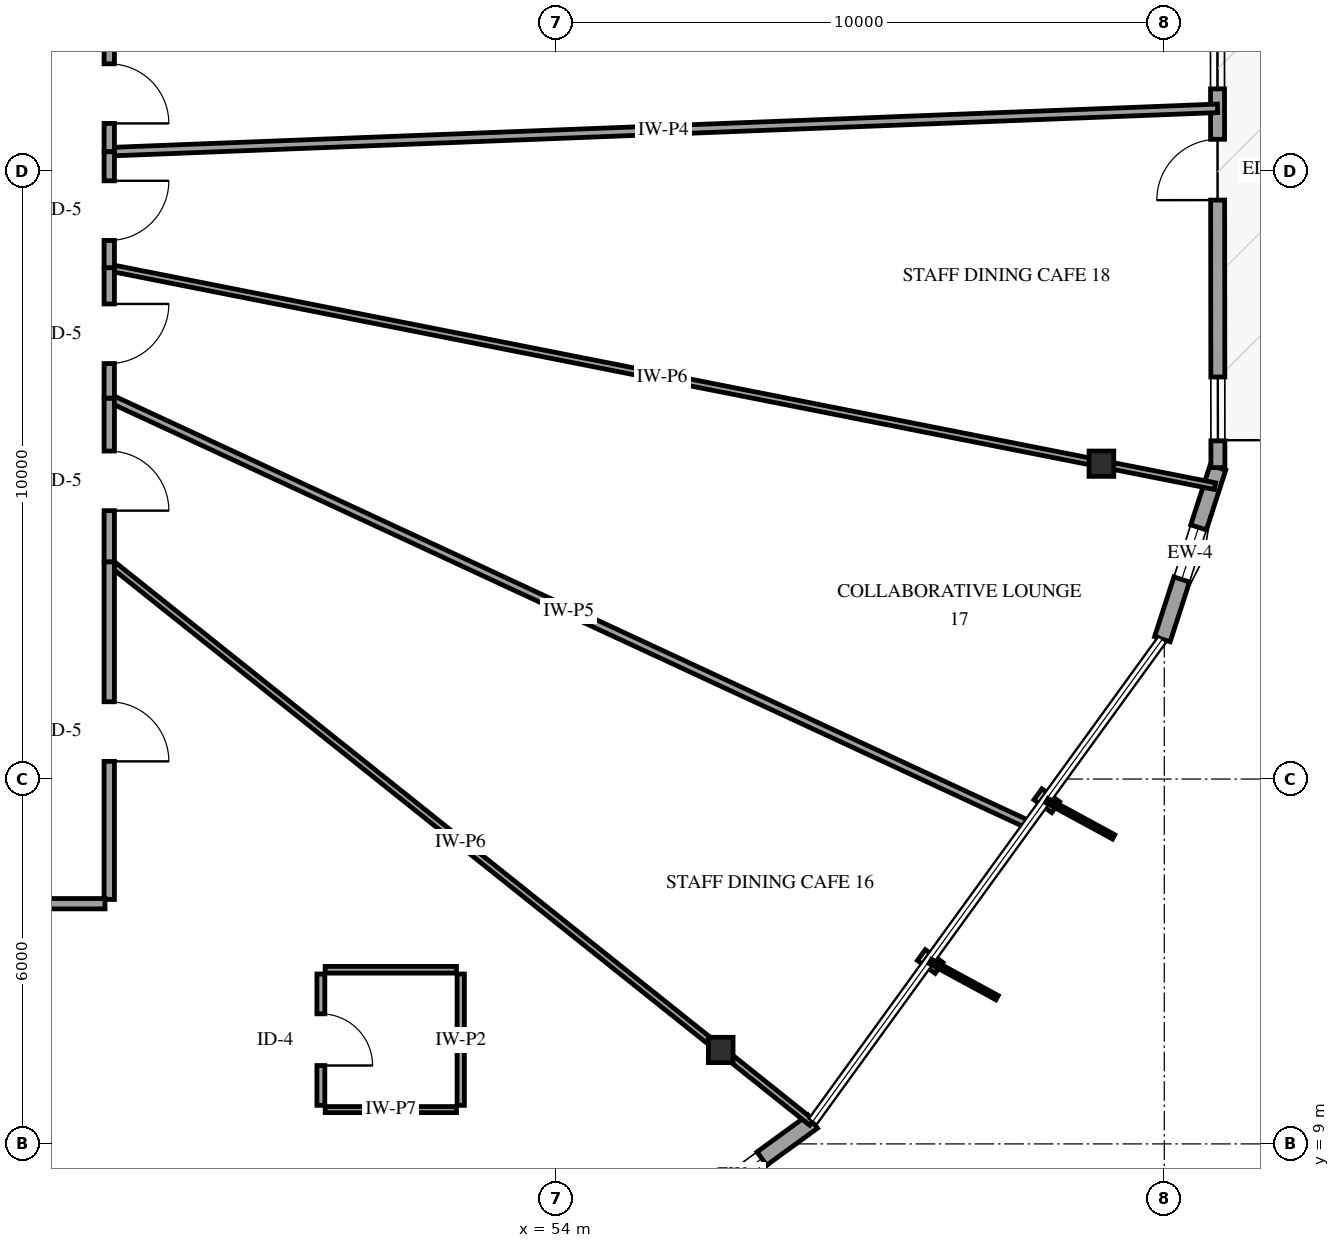
"""IFC4 building model, lengths in metres.
Left out: names, types, materials, properties, quantities, classifications, styles, units other than length and angle.
Written with IfcOpenShell. Run it as: python <this file> out.ifc"""

import sys

from ifc_helpers import new_model, si_unit, direction, frame, frame_2d, origin, origin_2d, place, context, subcontext, project, spatial, rectangle, i_section, extrude, element, fill, save


model = new_model("IFC4")
c1 = context("Model", 3, precision=1e-05, world=origin(), true_north=direction((0.0, 1.0)))
c2 = subcontext(c1, "Body", "Model", "MODEL_VIEW")
j1 = project(units=[si_unit("LENGTHUNIT", "METRE"), si_unit("PLANEANGLEUNIT", "RADIAN")], contexts=[c1])
p1 = place(None, origin())
s1 = spatial("IfcSite", under=j1, at=p1, CompositionType="ELEMENT")
p2 = place(p1, origin())
s2 = spatial("IfcBuilding", under=s1, at=p2, CompositionType="ELEMENT")
p3 = place(p2, frame((0.0, 0.0, 230.2)))
s3 = spatial("IfcBuildingStorey", under=s2, at=p3, CompositionType="ELEMENT", Elevation=230.2)
for number, where, z_axis, x_axis in (
    (1, (56.705, 10.545, 0.0), (0.0, 0.0, 1.0), (1.0, 0.0, 0.0)),
    (2, (62.966, 20.186, 0.0), (0.0, 0.0, 1.0), (1.0, 0.0, 0.0)),
):
    element("IfcColumn", number, at=place(p3, frame(where, z_axis=z_axis, x_axis=x_axis)), inside=s3, PredefinedType="COLUMN", context=c2, shape_type="SweptSolid", body=[
        extrude(i_section(OverallWidth=0.406, OverallDepth=0.416, WebThickness=0.03, FlangeThickness=0.048, FilletRadius=0.038, at=origin_2d()), origin(), (0.0, 0.0, 1.0), 3.6),
    ])
p4 = place(p3, frame((55.82, 7.621, 0.0), z_axis=(0.0, 0.0, 1.0), x_axis=(0.808383627719, 0.58865602047, 0.0)))
e3 = element("IfcWall", 3, at=p4, inside=s3, PredefinedType="SOLIDWALL", context=c2, shape_type="SweptSolid", body=[
    extrude(rectangle(XDim=2.967, YDim=0.27, at=frame_2d((1.483, 0.0))), origin(), (0.0, 0.0, 1.0), 2.679),
])
p5 = place(p4, frame((1.033, 0.0, 0.75)))
e4 = element("IfcOpeningElement", 4, at=p5, cuts=e3, PredefinedType="OPENING", context=c2, shape_type="SweptSolid", body=[
    extrude(rectangle(XDim=0.9, YDim=1.5, at=frame_2d((0.45, 0.75))), frame((0.0, 0.145, 0.0), z_axis=(0.0, -1.0, 0.0), x_axis=(1.0, 0.0, 0.0)), (0.0, 0.0, 1.0), 0.29),
])
p6 = place(p3, frame((63.969, 17.3, 0.0), z_axis=(0.0, 0.0, 1.0), x_axis=(0.307945174151, 0.95140410432, 0.0)))
e5 = element("IfcWall", 5, at=p6, inside=s3, PredefinedType="SOLIDWALL", context=c2, shape_type="SweptSolid", body=[
    extrude(rectangle(XDim=2.967, YDim=0.27, at=frame_2d((1.483, 0.0))), origin(), (0.0, 0.0, 1.0), 2.679),
])
p7 = place(p6, frame((1.033, 0.0, 0.75)))
e6 = element("IfcOpeningElement", 6, at=p7, cuts=e5, PredefinedType="OPENING", context=c2, shape_type="SweptSolid", body=[
    extrude(rectangle(XDim=0.9, YDim=1.5, at=frame_2d((0.45, 0.75))), frame((0.0, 0.145, 0.0), z_axis=(0.0, -1.0, 0.0), x_axis=(1.0, 0.0, 0.0)), (0.0, 0.0, 1.0), 0.29),
])
p8 = place(p3, frame((64.882, 20.122, 0.0), z_axis=(0.0, 0.0, 1.0), x_axis=(-0.001046571902, 0.999999452343, 0.0)))
e7 = element("IfcWall", 7, at=p8, inside=s3, PredefinedType="SOLIDWALL", context=c2, shape_type="SweptSolid", body=[
    extrude(rectangle(XDim=9.798, YDim=0.23, at=frame_2d((4.899, 0.0))), origin(), (0.0, 0.0, 1.0), 2.679),
])
p9 = place(p8, frame((4.399, 0.0, 0.0)))
e8 = element("IfcOpeningElement", 8, at=p9, cuts=e7, PredefinedType="OPENING", context=c2, shape_type="SweptSolid", body=[
    extrude(rectangle(XDim=1.0, YDim=2.15, at=frame_2d((0.5, 1.075))), frame((0.0, 0.125, 0.0), z_axis=(0.0, -1.0, 0.0), x_axis=(1.0, 0.0, 0.0)), (0.0, 0.0, 1.0), 0.25),
])
p10 = place(p8, frame((0.44, 0.0, 0.72)))
e9 = element("IfcOpeningElement", 9, at=p10, cuts=e7, PredefinedType="OPENING", context=c2, shape_type="SweptSolid", body=[
    extrude(rectangle(XDim=1.05, YDim=1.55, at=frame_2d((0.525, 0.775))), frame((0.0, 0.125, 0.0), z_axis=(0.0, -1.0, 0.0), x_axis=(1.0, 0.0, 0.0)), (0.0, 0.0, 1.0), 0.25),
])
p11 = place(p8, frame((6.228, 0.0, 0.72)))
e10 = element("IfcOpeningElement", 10, at=p11, cuts=e7, PredefinedType="OPENING", context=c2, shape_type="SweptSolid", body=[
    extrude(rectangle(XDim=1.05, YDim=1.55, at=frame_2d((0.525, 0.775))), frame((0.0, 0.125, 0.0), z_axis=(0.0, -1.0, 0.0), x_axis=(1.0, 0.0, 0.0)), (0.0, 0.0, 1.0), 0.25),
])
p12 = place(p3, frame((46.65, 23.41, 0.0), z_axis=(0.0, 0.0, 1.0), x_axis=(0.981032456838, -0.193843541625, 0.0)))
e11 = element("IfcWall", 11, at=p12, inside=s3, PredefinedType="PARTITIONING", context=c2, shape_type="SweptSolid", body=[
    extrude(rectangle(XDim=18.536, YDim=0.11, at=frame_2d((9.268, 0.0))), origin(), (0.0, 0.0, 1.0), 2.595),
])
p13 = place(p3, frame((64.876, 26.03, 0.0), z_axis=(0.0, 0.0, 1.0), x_axis=(-0.999233316869, -0.039150714655, 0.0)))
e12 = element("IfcWall", 12, at=p13, inside=s3, PredefinedType="PARTITIONING", context=c2, shape_type="SweptSolid", body=[
    extrude(rectangle(XDim=18.24, YDim=0.14, at=frame_2d((9.12, 0.0))), origin(), (0.0, 0.0, 1.0), 3.3),
])
p14 = place(p3, frame((46.65, 21.265, 0.0), z_axis=(0.0, 0.0, 1.0), x_axis=(0.907110307169, -0.420892968137, 0.0)))
e13 = element("IfcWall", 13, at=p14, inside=s3, PredefinedType="PARTITIONING", context=c2, shape_type="SweptSolid", body=[
    extrude(rectangle(XDim=16.657, YDim=0.13, at=frame_2d((8.329, 0.0))), origin(), (0.0, 0.0, 1.0), 3.3),
])
p15 = place(p3, frame((46.65, 18.573, 0.0), z_axis=(0.0, 0.0, 1.0), x_axis=(0.781517773411, -0.623882977683, 0.0)))
e14 = element("IfcWall", 14, at=p15, inside=s3, PredefinedType="PARTITIONING", context=c2, shape_type="SweptSolid", body=[
    extrude(rectangle(XDim=14.781, YDim=0.11, at=frame_2d((7.391, 0.0))), origin(), (0.0, 0.0, 1.0), 3.3),
])
p16 = place(p3, frame((46.65, 18.573, 0.0), z_axis=(0.0, 0.0, 1.0), x_axis=(0.0, -1.0, 0.0)))
e15 = element("IfcWall", 15, at=p16, inside=s3, PredefinedType="PARTITIONING", context=c2, shape_type="SweptSolid", body=[
    extrude(rectangle(XDim=5.553, YDim=0.17, at=frame_2d((2.776, 0.0))), origin(), (0.0, 0.0, 1.0), 3.3),
])
p17 = place(p16, frame((2.302, 0.0, 0.0)))
e16 = element("IfcOpeningElement", 16, at=p17, cuts=e15, PredefinedType="OPENING", context=c2, shape_type="SweptSolid", body=[
    extrude(rectangle(XDim=0.98, YDim=2.15, at=frame_2d((0.49, 1.075))), frame((0.0, 0.095, 0.0), z_axis=(0.0, -1.0, 0.0), x_axis=(1.0, 0.0, 0.0)), (0.0, 0.0, 1.0), 0.19),
])
p18 = place(p3, frame((46.58, 12.95, 0.0), z_axis=(0.0, 0.0, 1.0), x_axis=(-1.0, 0.0, 0.0)))
e17 = element("IfcWall", 17, at=p18, inside=s3, PredefinedType="PARTITIONING", context=c2, shape_type="SweptSolid", body=[
    extrude(rectangle(XDim=5.38, YDim=0.17, at=frame_2d((2.69, 0.0))), origin(), (0.0, 0.0, 1.0), 3.3),
])
p19 = place(p3, frame((46.65, 21.265, 0.0), z_axis=(0.0, 0.0, 1.0), x_axis=(0.0, -1.0, 0.0)))
e18 = element("IfcWall", 18, at=p19, inside=s3, PredefinedType="PARTITIONING", context=c2, shape_type="SweptSolid", body=[
    extrude(rectangle(XDim=2.692, YDim=0.17, at=frame_2d((1.346, 0.0))), origin(), (0.0, 0.0, 1.0), 3.3),
])
p20 = place(p19, frame((0.871, 0.0, 0.0)))
e19 = element("IfcOpeningElement", 19, at=p20, cuts=e18, PredefinedType="OPENING", context=c2, shape_type="SweptSolid", body=[
    extrude(rectangle(XDim=0.98, YDim=2.15, at=frame_2d((0.49, 1.075))), frame((0.0, 0.095, 0.0), z_axis=(0.0, -1.0, 0.0), x_axis=(1.0, 0.0, 0.0)), (0.0, 0.0, 1.0), 0.19),
])
p21 = place(p3, frame((50.13, 11.794, 0.0), z_axis=(0.0, 0.0, 1.0), x_axis=(0.0, -1.0, 0.0)))
e20 = element("IfcWall", 20, at=p21, inside=s3, PredefinedType="PARTITIONING", context=c2, shape_type="SweptSolid", body=[
    extrude(rectangle(XDim=2.16, YDim=0.13, at=frame_2d((1.08, 0.0))), origin(), (0.0, 0.0, 1.0), 3.3),
])
p22 = place(p21, frame((0.655, 0.0, 0.0)))
e21 = element("IfcOpeningElement", 21, at=p22, cuts=e20, PredefinedType="OPENING", context=c2, shape_type="SweptSolid", body=[
    extrude(rectangle(XDim=0.85, YDim=2.1, at=frame_2d((0.425, 1.05))), frame((0.0, 0.075, 0.0), z_axis=(0.0, -1.0, 0.0), x_axis=(1.0, 0.0, 0.0)), (0.0, 0.0, 1.0), 0.15),
])
p23 = place(p3, frame((52.43, 9.634, 0.0), z_axis=(0.0, 0.0, 1.0), x_axis=(0.0, 1.0, 0.0)))
e22 = element("IfcWall", 22, at=p23, inside=s3, PredefinedType="PARTITIONING", context=c2, shape_type="SweptSolid", body=[
    extrude(rectangle(XDim=2.16, YDim=0.12, at=frame_2d((1.08, 0.0))), origin(), (0.0, 0.0, 1.0), 3.3),
])
p24 = place(p3, frame((52.36, 11.864, 0.0), z_axis=(0.0, 0.0, 1.0), x_axis=(-1.0, 0.0, 0.0)))
e23 = element("IfcWall", 23, at=p24, inside=s3, PredefinedType="PARTITIONING", context=c2, shape_type="SweptSolid", body=[
    extrude(rectangle(XDim=2.16, YDim=0.11, at=frame_2d((1.08, 0.0))), origin(), (0.0, 0.0, 1.0), 3.3),
])
p25 = place(p3, frame((50.2, 9.564, 0.0), z_axis=(0.0, 0.0, 1.0), x_axis=(1.0, 0.0, 0.0)))
e24 = element("IfcWall", 24, at=p25, inside=s3, PredefinedType="PARTITIONING", context=c2, shape_type="SweptSolid", body=[
    extrude(rectangle(XDim=2.16, YDim=0.1, at=frame_2d((1.08, 0.0))), origin(), (0.0, 0.0, 1.0), 3.3),
])
p26 = place(p3, frame((46.65, 23.41, 0.0), z_axis=(0.0, 0.0, 1.0), x_axis=(0.0, -1.0, 0.0)))
e25 = element("IfcWall", 25, at=p26, inside=s3, PredefinedType="PARTITIONING", context=c2, shape_type="SweptSolid", body=[
    extrude(rectangle(XDim=2.145, YDim=0.17, at=frame_2d((1.073, 0.0))), origin(), (0.0, 0.0, 1.0), 3.3),
])
p27 = place(p26, frame((0.597, 0.0, 0.0)))
e26 = element("IfcOpeningElement", 26, at=p27, cuts=e25, PredefinedType="OPENING", context=c2, shape_type="SweptSolid", body=[
    extrude(rectangle(XDim=0.98, YDim=2.15, at=frame_2d((0.49, 1.075))), frame((0.0, 0.095, 0.0), z_axis=(0.0, -1.0, 0.0), x_axis=(1.0, 0.0, 0.0)), (0.0, 0.0, 1.0), 0.19),
])
p28 = place(p3, frame((46.65, 27.258, 0.0), z_axis=(0.0, 0.0, 1.0), x_axis=(0.0, -1.0, 0.0)))
e27 = element("IfcWall", 27, at=p28, inside=s3, PredefinedType="PARTITIONING", context=c2, shape_type="SweptSolid", body=[
    extrude(rectangle(XDim=1.942, YDim=0.17, at=frame_2d((0.971, 0.0))), origin(), (0.0, 0.0, 1.0), 3.3),
])
p29 = place(p28, frame((0.496, 0.0, 0.0)))
e28 = element("IfcOpeningElement", 28, at=p29, cuts=e27, PredefinedType="OPENING", context=c2, shape_type="SweptSolid", body=[
    extrude(rectangle(XDim=0.98, YDim=2.15, at=frame_2d((0.49, 1.075))), frame((0.0, 0.095, 0.0), z_axis=(0.0, -1.0, 0.0), x_axis=(1.0, 0.0, 0.0)), (0.0, 0.0, 1.0), 0.19),
])
p30 = place(p3, frame((46.65, 25.316, 0.0), z_axis=(0.0, 0.0, 1.0), x_axis=(0.0, -1.0, 0.0)))
e29 = element("IfcWall", 29, at=p30, inside=s3, PredefinedType="PARTITIONING", context=c2, shape_type="SweptSolid", body=[
    extrude(rectangle(XDim=1.906, YDim=0.17, at=frame_2d((0.953, 0.0))), origin(), (0.0, 0.0, 1.0), 3.3),
])
p31 = place(p30, frame((0.478, 0.0, 0.0)))
e30 = element("IfcOpeningElement", 30, at=p31, cuts=e29, PredefinedType="OPENING", context=c2, shape_type="SweptSolid", body=[
    extrude(rectangle(XDim=0.98, YDim=2.15, at=frame_2d((0.49, 1.075))), frame((0.0, 0.095, 0.0), z_axis=(0.0, -1.0, 0.0), x_axis=(1.0, 0.0, 0.0)), (0.0, 0.0, 1.0), 0.19),
])
p32 = place(p5, origin())
e31 = element("IfcWindow", 31, at=p32, inside=s3, PartitioningType="SINGLE_PANEL", PredefinedType="WINDOW", context=c2, shape_type="SweptSolid", body=[
    extrude(rectangle(XDim=0.9, YDim=1.5, at=frame_2d((0.45, 0.75))), frame((0.0, 0.03, 0.0), z_axis=(0.0, -1.0, 0.0), x_axis=(1.0, 0.0, 0.0)), (0.0, 0.0, 1.0), 0.06),
])
fill(e4, e31)
p33 = place(p7, origin())
e32 = element("IfcWindow", 32, at=p33, inside=s3, PartitioningType="SINGLE_PANEL", PredefinedType="WINDOW", context=c2, shape_type="SweptSolid", body=[
    extrude(rectangle(XDim=0.9, YDim=1.5, at=frame_2d((0.45, 0.75))), frame((0.0, 0.03, 0.0), z_axis=(0.0, -1.0, 0.0), x_axis=(1.0, 0.0, 0.0)), (0.0, 0.0, 1.0), 0.06),
])
fill(e6, e32)
p34 = place(p9, origin())
e33 = element("IfcDoor", 33, at=p34, inside=s3, OperationType="SINGLE_SWING_LEFT", PredefinedType="DOOR", context=c2, shape_type="SweptSolid", body=[
    extrude(rectangle(XDim=1.0, YDim=2.15, at=frame_2d((0.5, 1.075))), frame((0.0, 0.025, 0.0), z_axis=(0.0, -1.0, 0.0), x_axis=(1.0, 0.0, 0.0)), (0.0, 0.0, 1.0), 0.05),
])
fill(e8, e33)
p35 = place(p10, origin())
e34 = element("IfcWindow", 34, at=p35, inside=s3, PartitioningType="SINGLE_PANEL", PredefinedType="WINDOW", context=c2, shape_type="SweptSolid", body=[
    extrude(rectangle(XDim=1.05, YDim=1.55, at=frame_2d((0.525, 0.775))), frame((0.0, 0.03, 0.0), z_axis=(0.0, -1.0, 0.0), x_axis=(1.0, 0.0, 0.0)), (0.0, 0.0, 1.0), 0.06),
])
fill(e9, e34)
p36 = place(p11, origin())
e35 = element("IfcWindow", 35, at=p36, inside=s3, PartitioningType="SINGLE_PANEL", PredefinedType="WINDOW", context=c2, shape_type="SweptSolid", body=[
    extrude(rectangle(XDim=1.05, YDim=1.55, at=frame_2d((0.525, 0.775))), frame((0.0, 0.03, 0.0), z_axis=(0.0, -1.0, 0.0), x_axis=(1.0, 0.0, 0.0)), (0.0, 0.0, 1.0), 0.06),
])
fill(e10, e35)
p37 = place(p17, origin())
e36 = element("IfcDoor", 36, at=p37, inside=s3, OperationType="SINGLE_SWING_RIGHT", PredefinedType="DOOR", context=c2, shape_type="SweptSolid", body=[
    extrude(rectangle(XDim=0.98, YDim=2.15, at=frame_2d((0.49, 1.075))), frame((0.0, 0.025, 0.0), z_axis=(0.0, -1.0, 0.0), x_axis=(1.0, 0.0, 0.0)), (0.0, 0.0, 1.0), 0.05),
])
fill(e16, e36)
p38 = place(p20, origin())
e37 = element("IfcDoor", 37, at=p38, inside=s3, OperationType="SINGLE_SWING_RIGHT", PredefinedType="DOOR", context=c2, shape_type="SweptSolid", body=[
    extrude(rectangle(XDim=0.98, YDim=2.15, at=frame_2d((0.49, 1.075))), frame((0.0, 0.025, 0.0), z_axis=(0.0, -1.0, 0.0), x_axis=(1.0, 0.0, 0.0)), (0.0, 0.0, 1.0), 0.05),
])
fill(e19, e37)
p39 = place(p22, origin())
e38 = element("IfcDoor", 38, at=p39, inside=s3, OperationType="SINGLE_SWING_RIGHT", PredefinedType="DOOR", context=c2, shape_type="SweptSolid", body=[
    extrude(rectangle(XDim=0.85, YDim=2.1, at=frame_2d((0.425, 1.05))), frame((0.0, 0.025, 0.0), z_axis=(0.0, -1.0, 0.0), x_axis=(1.0, 0.0, 0.0)), (0.0, 0.0, 1.0), 0.05),
])
fill(e21, e38)
p40 = place(p27, origin())
e39 = element("IfcDoor", 39, at=p40, inside=s3, OperationType="SINGLE_SWING_LEFT", PredefinedType="DOOR", context=c2, shape_type="SweptSolid", body=[
    extrude(rectangle(XDim=0.98, YDim=2.15, at=frame_2d((0.49, 1.075))), frame((0.0, 0.025, 0.0), z_axis=(0.0, -1.0, 0.0), x_axis=(1.0, 0.0, 0.0)), (0.0, 0.0, 1.0), 0.05),
])
fill(e26, e39)
p41 = place(p29, origin())
e40 = element("IfcDoor", 40, at=p41, inside=s3, OperationType="SINGLE_SWING_RIGHT", PredefinedType="DOOR", context=c2, shape_type="SweptSolid", body=[
    extrude(rectangle(XDim=0.98, YDim=2.15, at=frame_2d((0.49, 1.075))), frame((0.0, 0.025, 0.0), z_axis=(0.0, -1.0, 0.0), x_axis=(1.0, 0.0, 0.0)), (0.0, 0.0, 1.0), 0.05),
])
fill(e28, e40)
p42 = place(p31, origin())
e41 = element("IfcDoor", 41, at=p42, inside=s3, OperationType="SINGLE_SWING_LEFT", PredefinedType="DOOR", context=c2, shape_type="SweptSolid", body=[
    extrude(rectangle(XDim=0.98, YDim=2.15, at=frame_2d((0.49, 1.075))), frame((0.0, 0.025, 0.0), z_axis=(0.0, -1.0, 0.0), x_axis=(1.0, 0.0, 0.0)), (0.0, 0.0, 1.0), 0.05),
])
fill(e30, e41)
save(model, sys.argv[1])
